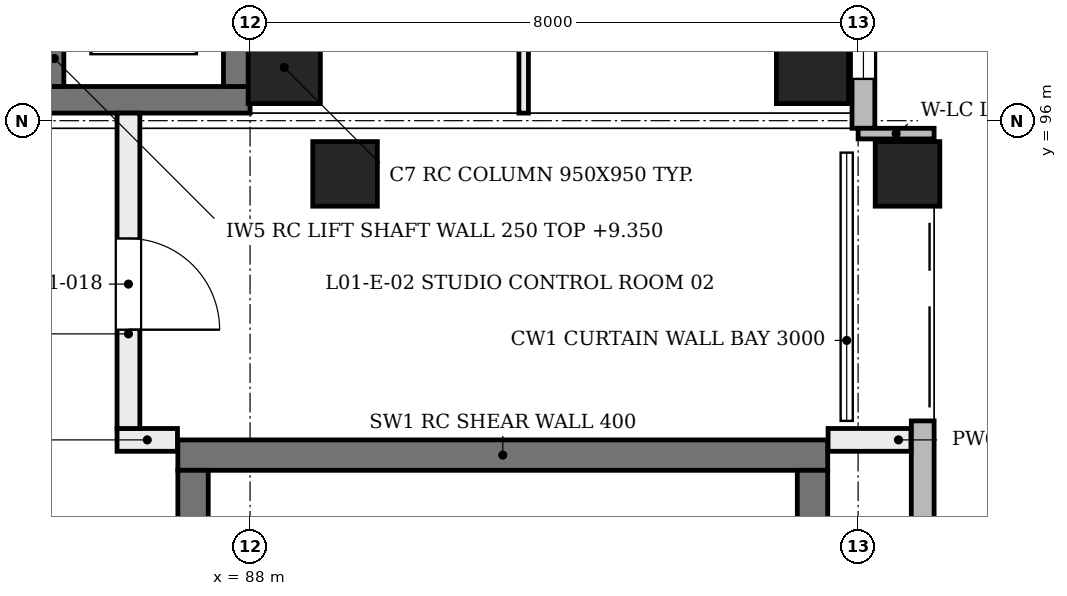
"""IFC4 building model, lengths in metres.
Left out: names, types, materials, properties, quantities, classifications, styles, units other than length and angle.
Written with IfcOpenShell. Run it as: python <this file> out.ifc"""

import sys

from ifc_helpers import new_model, si_unit, direction, frame, frame_2d, origin, origin_2d, place, context, subcontext, project, spatial, rectangle, extrude, element, fill, save


model = new_model("IFC4")
c1 = context("Model", 3, precision=1e-05, world=origin(), true_north=direction((0.0, 1.0)))
c2 = subcontext(c1, "Body", "Model", "MODEL_VIEW")
j1 = project(units=[si_unit("LENGTHUNIT", "METRE"), si_unit("PLANEANGLEUNIT", "RADIAN")], contexts=[c1])
p1 = place(None, origin())
s1 = spatial("IfcSite", under=j1, at=p1, CompositionType="ELEMENT")
p2 = place(p1, origin())
s2 = spatial("IfcBuilding", under=s1, at=p2, CompositionType="ELEMENT")
p3 = place(p2, frame((0.0, 0.0, 4.8)))
s3 = spatial("IfcBuildingStorey", under=s2, at=p3, CompositionType="ELEMENT", Elevation=4.8)
p4 = place(p3, frame((87.05, 91.6, 0.0), z_axis=(0.0, 0.0, 1.0), x_axis=(1.0, 0.0, 0.0)))
e1 = element("IfcWall", 1, at=p4, inside=s3, PredefinedType="SHEAR", context=c2, shape_type="SweptSolid", body=[
    extrude(rectangle(XDim=8.55, YDim=0.4, at=frame_2d((4.275, 0.0))), origin(), (0.0, 0.0, 1.0), 4.58),
])
for number, where, z_axis, x_axis in (
    (2, (87.25, 75.8, 0.0), (0.0, 0.0, 1.0), (0.0, 1.0, 0.0)),
    (3, (95.4, 75.8, 0.0), (0.0, 0.0, 1.0), (0.0, 1.0, 0.0)),
):
    element("IfcWall", number, at=place(p3, frame(where, z_axis=z_axis, x_axis=x_axis)), inside=s3, PredefinedType="SHEAR", context=c2, shape_type="SweptSolid", body=[
        extrude(rectangle(XDim=15.6, YDim=0.4, at=frame_2d((7.8, 0.0))), origin(), (0.0, 0.0, 1.0), 4.58),
    ])
p5 = place(p3, frame((80.1, 96.275, 0.0), z_axis=(0.0, 0.0, 1.0), x_axis=(1.0, 0.0, 0.0)))
e4 = element("IfcWall", 4, at=p5, inside=s3, PredefinedType="SHEAR", context=c2, shape_type="SweptSolid", body=[
    extrude(rectangle(XDim=7.9, YDim=0.35, at=frame_2d((3.95, 0.0))), origin(), (0.0, 0.0, 1.0), 4.58),
])
p6 = place(p3, frame((87.825, 96.45, 0.0), z_axis=(0.0, 0.0, 1.0), x_axis=(0.0, 1.0, 0.0)))
e5 = element("IfcWall", 5, at=p6, inside=s3, PredefinedType="SHEAR", context=c2, shape_type="SweptSolid", body=[
    extrude(rectangle(XDim=15.2, YDim=0.35, at=frame_2d((7.6, 0.0))), origin(), (0.0, 0.0, 1.0), 4.58),
])
p7 = place(p6, frame((13.25, 0.0, 0.0)))
e6 = element("IfcOpeningElement", 6, at=p7, cuts=e5, PredefinedType="OPENING", context=c2, shape_type="SweptSolid", body=[
    extrude(rectangle(XDim=1.0, YDim=2.1, at=frame_2d((0.5, 1.05))), frame((0.0, 0.185, 0.0), z_axis=(0.0, -1.0, 0.0), x_axis=(1.0, 0.0, 0.0)), (0.0, 0.0, 1.0), 0.37),
])
p8 = place(p6, frame((3.2, 0.0, 0.0)))
e7 = element("IfcOpeningElement", 7, at=p8, cuts=e5, PredefinedType="OPENING", context=c2, shape_type="SweptSolid", body=[
    extrude(rectangle(XDim=1.4, YDim=2.1, at=frame_2d((0.7, 1.05))), frame((0.0, 0.185, 0.0), z_axis=(0.0, -1.0, 0.0), x_axis=(1.0, 0.0, 0.0)), (0.0, 0.0, 1.0), 0.37),
])
for number, where, z_axis, x_axis in (
    (8, (88.45, 96.7, 0.0), (0.0, 0.0, 1.0), (1.0, 0.0, 0.0)),
    (9, (95.4, 96.7, 0.0), (0.0, 0.0, 1.0), (1.0, 0.0, 0.0)),
):
    element("IfcColumn", number, at=place(p3, frame(where, z_axis=z_axis, x_axis=x_axis)), inside=s3, PredefinedType="COLUMN", context=c2, shape_type="SweptSolid", body=[
        extrude(rectangle(XDim=0.95, YDim=0.95, at=origin_2d()), origin(), (0.0, 0.0, 1.0), 4.8),
    ])
for number, where, z_axis, x_axis in (
    (10, (89.0, 95.3, 0.0), (0.204, 0.0, 0.979), (0.0, 1.0, 0.0)),
    (11, (96.4, 95.3, 0.0), (0.204, 0.0, 0.979), (0.0, 1.0, 0.0)),
):
    element("IfcColumn", number, at=place(p3, frame(where, z_axis=z_axis, x_axis=x_axis)), inside=s3, PredefinedType="COLUMN", context=c2, shape_type="SweptSolid", body=[
        extrude(rectangle(XDim=0.85, YDim=0.85, at=origin_2d()), origin(), (0.0, 0.0, 1.0), 4.903),
    ])
p9 = place(p3, frame((96.85, 67.95, 0.0), z_axis=(0.0, 0.0, 1.0), x_axis=(0.0, 1.0, 0.0)))
e12 = element("IfcWall", 12, at=p9, inside=s3, PredefinedType="SOLIDWALL", context=c2, shape_type="SweptSolid", body=[
    extrude(rectangle(XDim=24.1, YDim=0.3, at=frame_2d((12.05, 0.0))), origin(), (0.0, 0.0, 1.0), 3.9),
])
p10 = place(p3, frame((96.07, 95.9, 0.0), z_axis=(0.0, 0.0, 1.0), x_axis=(0.0, 1.0, 0.0)))
e13 = element("IfcWall", 13, at=p10, inside=s3, PredefinedType="SOLIDWALL", context=c2, shape_type="SweptSolid", body=[
    extrude(rectangle(XDim=16.4, YDim=0.3, at=frame_2d((8.2, 0.0))), origin(), (0.0, 0.0, 1.0), 3.9),
])
p11 = place(p10, frame((0.65, 0.0, 0.75)))
e14 = element("IfcOpeningElement", 14, at=p11, cuts=e13, PredefinedType="OPENING", context=c2, shape_type="SweptSolid", body=[
    extrude(rectangle(XDim=1.8, YDim=3.1, at=frame_2d((0.9, 1.55))), frame((0.0, 0.16, 0.0), z_axis=(0.0, -1.0, 0.0), x_axis=(1.0, 0.0, 0.0)), (0.0, 0.0, 1.0), 0.32),
])
p12 = place(p10, frame((3.35, 0.0, 0.75)))
e15 = element("IfcOpeningElement", 15, at=p12, cuts=e13, PredefinedType="OPENING", context=c2, shape_type="SweptSolid", body=[
    extrude(rectangle(XDim=1.8, YDim=3.1, at=frame_2d((0.9, 1.55))), frame((0.0, 0.16, 0.0), z_axis=(0.0, -1.0, 0.0), x_axis=(1.0, 0.0, 0.0)), (0.0, 0.0, 1.0), 0.32),
])
p13 = place(p10, frame((6.05, 0.0, 0.75)))
e16 = element("IfcOpeningElement", 16, at=p13, cuts=e13, PredefinedType="OPENING", context=c2, shape_type="SweptSolid", body=[
    extrude(rectangle(XDim=1.8, YDim=3.1, at=frame_2d((0.9, 1.55))), frame((0.0, 0.16, 0.0), z_axis=(0.0, -1.0, 0.0), x_axis=(1.0, 0.0, 0.0)), (0.0, 0.0, 1.0), 0.32),
])
p14 = place(p10, frame((8.75, 0.0, 0.75)))
e17 = element("IfcOpeningElement", 17, at=p14, cuts=e13, PredefinedType="OPENING", context=c2, shape_type="SweptSolid", body=[
    extrude(rectangle(XDim=1.8, YDim=3.1, at=frame_2d((0.9, 1.55))), frame((0.0, 0.16, 0.0), z_axis=(0.0, -1.0, 0.0), x_axis=(1.0, 0.0, 0.0)), (0.0, 0.0, 1.0), 0.32),
])
p15 = place(p10, frame((11.45, 0.0, 0.75)))
e18 = element("IfcOpeningElement", 18, at=p15, cuts=e13, PredefinedType="OPENING", context=c2, shape_type="SweptSolid", body=[
    extrude(rectangle(XDim=1.8, YDim=3.1, at=frame_2d((0.9, 1.55))), frame((0.0, 0.16, 0.0), z_axis=(0.0, -1.0, 0.0), x_axis=(1.0, 0.0, 0.0)), (0.0, 0.0, 1.0), 0.32),
])
p16 = place(p10, frame((14.15, 0.0, 0.75)))
e19 = element("IfcOpeningElement", 19, at=p16, cuts=e13, PredefinedType="OPENING", context=c2, shape_type="SweptSolid", body=[
    extrude(rectangle(XDim=1.8, YDim=3.1, at=frame_2d((0.9, 1.55))), frame((0.0, 0.16, 0.0), z_axis=(0.0, -1.0, 0.0), x_axis=(1.0, 0.0, 0.0)), (0.0, 0.0, 1.0), 0.32),
])
p17 = place(p3, frame((96.0, 95.83, 0.0), z_axis=(0.0, 0.0, 1.0), x_axis=(1.0, 0.0, 0.0)))
e20 = element("IfcWall", 20, at=p17, inside=s3, PredefinedType="SOLIDWALL", context=c2, shape_type="SweptSolid", body=[
    extrude(rectangle(XDim=1.0, YDim=0.14, at=frame_2d((0.5, 0.0))), origin(), (0.0, 0.0, 1.0), 3.9),
])
p18 = place(p3, frame((85.425, 98.9, 0.0), z_axis=(0.0, 0.0, 1.0), x_axis=(0.0, -1.0, 0.0)))
e21 = element("IfcWall", 21, at=p18, inside=s3, PredefinedType="SOLIDWALL", context=c2, shape_type="SweptSolid", body=[
    extrude(rectangle(XDim=2.45, YDim=0.25, at=frame_2d((1.225, 0.0))), origin(), (0.0, 0.0, 1.0), 4.55),
])
p19 = place(p3, frame((86.25, 91.8, 0.0), z_axis=(0.0, 0.0, 1.0), x_axis=(1.0, 0.0, 0.0)))
e22 = element("IfcWall", 22, at=p19, inside=s3, PredefinedType="PARTITIONING", context=c2, shape_type="SweptSolid", body=[
    extrude(rectangle(XDim=0.795, YDim=0.3, at=frame_2d((0.397, 0.0))), origin(), (0.0, 0.0, 1.0), 4.56),
])
p20 = place(p3, frame((95.605, 91.8, 0.0), z_axis=(0.0, 0.0, 1.0), x_axis=(1.0, 0.0, 0.0)))
e23 = element("IfcWall", 23, at=p20, inside=s3, PredefinedType="PARTITIONING", context=c2, shape_type="SweptSolid", body=[
    extrude(rectangle(XDim=1.09, YDim=0.3, at=frame_2d((0.545, 0.0))), origin(), (0.0, 0.0, 1.0), 4.56),
])
p21 = place(p3, frame((86.4, 91.95, 0.0), z_axis=(0.0, 0.0, 1.0), x_axis=(0.0, 1.0, 0.0)))
e24 = element("IfcWall", 24, at=p21, inside=s3, PredefinedType="PARTITIONING", context=c2, shape_type="SweptSolid", body=[
    extrude(rectangle(XDim=4.15, YDim=0.3, at=frame_2d((2.075, 0.0))), origin(), (0.0, 0.0, 1.0), 3.88),
])
p22 = place(p21, frame((1.3, 0.0, 0.0)))
e25 = element("IfcOpeningElement", 25, at=p22, cuts=e24, PredefinedType="OPENING", context=c2, shape_type="SweptSolid", body=[
    extrude(rectangle(XDim=1.2, YDim=2.2, at=frame_2d((0.6, 1.1))), frame((0.0, 0.16, 0.0), z_axis=(0.0, -1.0, 0.0), x_axis=(1.0, 0.0, 0.0)), (0.0, 0.0, 1.0), 0.32),
])
p23 = place(p3, frame((91.6, 96.1, 0.0), z_axis=(0.0, 0.0, 1.0), x_axis=(0.0, 1.0, 0.0)))
e26 = element("IfcWall", 26, at=p23, inside=s3, PredefinedType="PARTITIONING", context=c2, shape_type="SweptSolid", body=[
    extrude(rectangle(XDim=9.567, YDim=0.125, at=frame_2d((4.783, 0.0))), origin(), (0.0, 0.0, 1.0), 3.88),
])
p24 = place(p23, frame((1.765, 0.0, 0.0)))
e27 = element("IfcOpeningElement", 27, at=p24, cuts=e26, PredefinedType="OPENING", context=c2, shape_type="SweptSolid", body=[
    extrude(rectangle(XDim=1.0, YDim=2.1, at=frame_2d((0.5, 1.05))), frame((0.0, 0.073, 0.0), z_axis=(0.0, -1.0, 0.0), x_axis=(1.0, 0.0, 0.0)), (0.0, 0.0, 1.0), 0.145),
])
p25 = place(p11, origin())
e28 = element("IfcWindow", 28, at=p25, inside=s3, PartitioningType="SINGLE_PANEL", PredefinedType="WINDOW", context=c2, shape_type="SweptSolid", body=[
    extrude(rectangle(XDim=1.8, YDim=3.1, at=frame_2d((0.9, 1.55))), frame((0.0, 0.03, 0.0), z_axis=(0.0, -1.0, 0.0), x_axis=(1.0, 0.0, 0.0)), (0.0, 0.0, 1.0), 0.06),
])
fill(e14, e28)
p26 = place(p22, frame((1.2, 0.0, 0.0), z_axis=(0.0, 0.0, 1.0), x_axis=(-1.0, 0.0, 0.0)))
e29 = element("IfcDoor", 29, at=p26, inside=s3, OperationType="SINGLE_SWING_LEFT", PredefinedType="DOOR", context=c2, shape_type="SweptSolid", body=[
    extrude(rectangle(XDim=1.2, YDim=2.2, at=frame_2d((0.6, 1.1))), frame((0.0, 0.025, 0.0), z_axis=(0.0, -1.0, 0.0), x_axis=(1.0, 0.0, 0.0)), (0.0, 0.0, 1.0), 0.05),
])
fill(e25, e29)
save(model, sys.argv[1])
